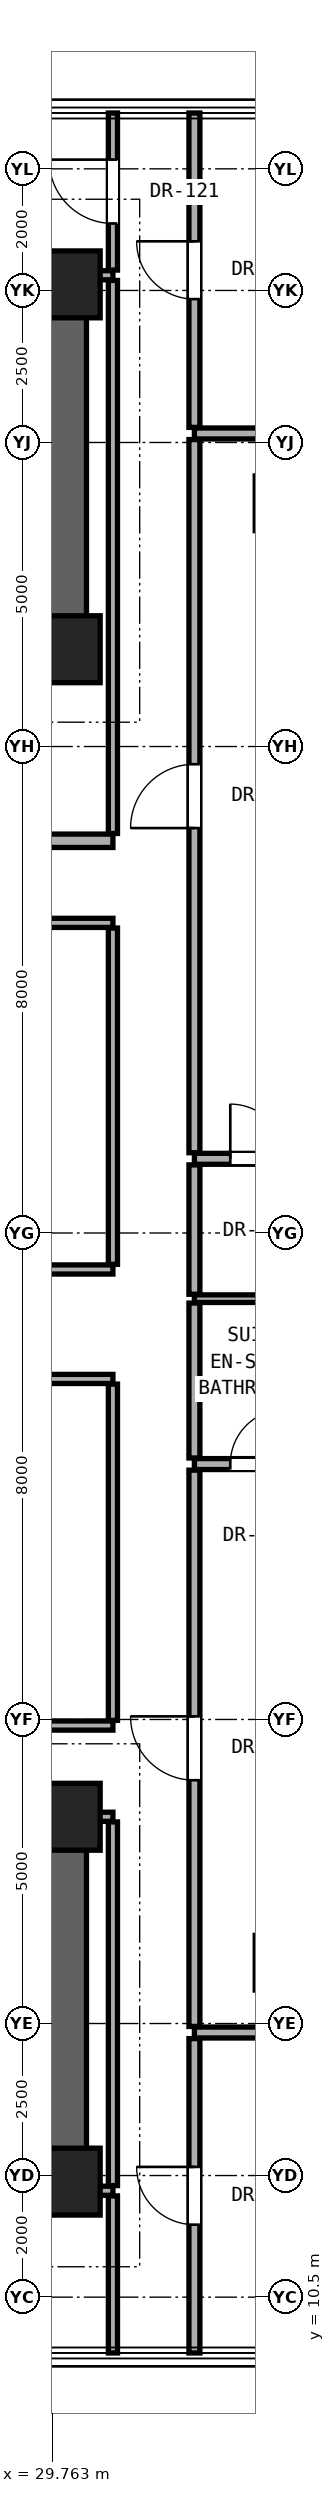
"""IFC4 building model, lengths in metres.
Left out: names, types, materials, properties, quantities, classifications, styles, units other than length and angle.
Written with IfcOpenShell. Run it as: python <this file> out.ifc"""

import sys

from ifc_helpers import new_model, si_unit, direction, frame, frame_2d, origin, origin_2d, place, context, subcontext, project, spatial, rectangle, extrude, element, fill, save


model = new_model("IFC4")
c1 = context("Model", 3, precision=1e-05, world=origin(), true_north=direction((0.0, 1.0)))
c2 = subcontext(c1, "Body", "Model", "MODEL_VIEW")
j1 = project(units=[si_unit("LENGTHUNIT", "METRE"), si_unit("PLANEANGLEUNIT", "RADIAN")], contexts=[c1])
p1 = place(None, origin())
s1 = spatial("IfcSite", under=j1, at=p1, CompositionType="ELEMENT")
p2 = place(p1, origin())
s2 = spatial("IfcBuilding", under=s1, at=p2, CompositionType="ELEMENT")
p3 = place(p2, frame((0.0, 0.0, 121.4)))
s3 = spatial("IfcBuildingStorey", under=s2, at=p3, CompositionType="ELEMENT", Elevation=121.4)
for number, where, z_axis, x_axis in (
    (1, (30.0, 12.4, 0.0), (0.0, 0.0, 1.0), (1.0, 0.0, 0.0)),
    (2, (30.0, 18.4, 0.0), (0.0, 0.0, 1.0), (1.0, 0.0, 0.0)),
    (3, (30.0, 37.6, 0.0), (0.0, 0.0, 1.0), (1.0, 0.0, 0.0)),
    (4, (30.0, 43.6, 0.0), (0.0, 0.0, 1.0), (1.0, 0.0, 0.0)),
):
    element("IfcColumn", number, at=place(p3, frame(where, z_axis=z_axis, x_axis=x_axis)), inside=s3, PredefinedType="COLUMN", context=c2, shape_type="SweptSolid", body=[
        extrude(rectangle(XDim=1.1, YDim=1.1, at=origin_2d()), origin(), (0.0, 0.0, 1.0), 3.3),
    ])
for number, where, z_axis, x_axis in (
    (5, (33.4, 16.0, 0.0), (0.0, 0.0, 1.0), (1.0, 0.0, 0.0)),
    (6, (33.4, 40.0, 0.0), (0.0, 0.0, 1.0), (1.0, 0.0, 0.0)),
):
    element("IfcColumn", number, at=place(p3, frame(where, z_axis=z_axis, x_axis=x_axis)), inside=s3, PredefinedType="PILASTER", context=c2, shape_type="SweptSolid", body=[
        extrude(rectangle(XDim=0.6, YDim=0.9, at=origin_2d()), origin(), (0.0, 0.0, 1.0), 3.3),
    ])
p4 = place(p3, frame((11.0, 43.6, 0.0), z_axis=(0.0, 0.0, 1.0), x_axis=(1.0, 0.0, 0.0)))
e7 = element("IfcWall", 7, at=p4, inside=s3, PredefinedType="SHEAR", context=c2, shape_type="SweptSolid", body=[
    extrude(rectangle(XDim=19.0, YDim=0.65, at=frame_2d((9.5, 0.0))), origin(), (0.0, 0.0, 1.0), 3.08),
])
p5 = place(p3, frame((30.0, 37.6, 0.0), z_axis=(0.0, 0.0, 1.0), x_axis=(0.0, 1.0, 0.0)))
e8 = element("IfcWall", 8, at=p5, inside=s3, PredefinedType="SHEAR", context=c2, shape_type="SweptSolid", body=[
    extrude(rectangle(XDim=6.0, YDim=0.65, at=frame_2d((3.0, 0.0))), origin(), (0.0, 0.0, 1.0), 3.08),
])
p6 = place(p3, frame((11.0, 37.6, 0.0), z_axis=(0.0, 0.0, 1.0), x_axis=(1.0, 0.0, 0.0)))
e9 = element("IfcWall", 9, at=p6, inside=s3, PredefinedType="SHEAR", context=c2, shape_type="SweptSolid", body=[
    extrude(rectangle(XDim=19.0, YDim=0.65, at=frame_2d((9.5, 0.0))), origin(), (0.0, 0.0, 1.0), 3.08),
])
p7 = place(p6, frame((1.06, 0.0, 0.0)))
e10 = element("IfcOpeningElement", 10, at=p7, cuts=e9, PredefinedType="OPENING", context=c2, shape_type="SweptSolid", body=[
    extrude(rectangle(XDim=1.15, YDim=2.2, at=frame_2d((0.575, 1.1))), frame((0.0, 0.335, 0.0), z_axis=(0.0, -1.0, 0.0), x_axis=(1.0, 0.0, 0.0)), (0.0, 0.0, 1.0), 0.67),
])
p8 = place(p6, frame((9.55, 0.0, 0.0)))
e11 = element("IfcOpeningElement", 11, at=p8, cuts=e9, PredefinedType="OPENING", context=c2, shape_type="SweptSolid", body=[
    extrude(rectangle(XDim=1.4, YDim=2.35, at=frame_2d((0.7, 1.175))), frame((0.0, 0.335, 0.0), z_axis=(0.0, -1.0, 0.0), x_axis=(1.0, 0.0, 0.0)), (0.0, 0.0, 1.0), 0.67),
])
p9 = place(p6, frame((11.95, 0.0, 0.0)))
e12 = element("IfcOpeningElement", 12, at=p9, cuts=e9, PredefinedType="OPENING", context=c2, shape_type="SweptSolid", body=[
    extrude(rectangle(XDim=1.4, YDim=2.35, at=frame_2d((0.7, 1.175))), frame((0.0, 0.335, 0.0), z_axis=(0.0, -1.0, 0.0), x_axis=(1.0, 0.0, 0.0)), (0.0, 0.0, 1.0), 0.67),
])
p10 = place(p3, frame((11.0, 12.4, 0.0), z_axis=(0.0, 0.0, 1.0), x_axis=(1.0, 0.0, 0.0)))
e13 = element("IfcWall", 13, at=p10, inside=s3, PredefinedType="SHEAR", context=c2, shape_type="SweptSolid", body=[
    extrude(rectangle(XDim=19.0, YDim=0.65, at=frame_2d((9.5, 0.0))), origin(), (0.0, 0.0, 1.0), 3.08),
])
p11 = place(p3, frame((30.0, 12.4, 0.0), z_axis=(0.0, 0.0, 1.0), x_axis=(0.0, 1.0, 0.0)))
e14 = element("IfcWall", 14, at=p11, inside=s3, PredefinedType="SHEAR", context=c2, shape_type="SweptSolid", body=[
    extrude(rectangle(XDim=6.0, YDim=0.65, at=frame_2d((3.0, 0.0))), origin(), (0.0, 0.0, 1.0), 3.08),
])
p12 = place(p3, frame((11.0, 18.4, 0.0), z_axis=(0.0, 0.0, 1.0), x_axis=(1.0, 0.0, 0.0)))
e15 = element("IfcWall", 15, at=p12, inside=s3, PredefinedType="SHEAR", context=c2, shape_type="SweptSolid", body=[
    extrude(rectangle(XDim=19.0, YDim=0.65, at=frame_2d((9.5, 0.0))), origin(), (0.0, 0.0, 1.0), 3.08),
])
p13 = place(p12, frame((4.175, 0.0, 0.0)))
e16 = element("IfcOpeningElement", 16, at=p13, cuts=e15, PredefinedType="OPENING", context=c2, shape_type="SweptSolid", body=[
    extrude(rectangle(XDim=1.2, YDim=2.25, at=frame_2d((0.6, 1.125))), frame((0.0, 0.335, 0.0), z_axis=(0.0, -1.0, 0.0), x_axis=(1.0, 0.0, 0.0)), (0.0, 0.0, 1.0), 0.67),
])
p14 = place(p12, frame((9.6, 0.0, 0.0)))
e17 = element("IfcOpeningElement", 17, at=p14, cuts=e15, PredefinedType="OPENING", context=c2, shape_type="SweptSolid", body=[
    extrude(rectangle(XDim=1.3, YDim=2.3, at=frame_2d((0.65, 1.15))), frame((0.0, 0.335, 0.0), z_axis=(0.0, -1.0, 0.0), x_axis=(1.0, 0.0, 0.0)), (0.0, 0.0, 1.0), 0.67),
])
p15 = place(p12, frame((11.9, 0.0, 0.0)))
e18 = element("IfcOpeningElement", 18, at=p15, cuts=e15, PredefinedType="OPENING", context=c2, shape_type="SweptSolid", body=[
    extrude(rectangle(XDim=1.3, YDim=2.3, at=frame_2d((0.65, 1.15))), frame((0.0, 0.335, 0.0), z_axis=(0.0, -1.0, 0.0), x_axis=(1.0, 0.0, 0.0)), (0.0, 0.0, 1.0), 0.67),
])
p16 = place(p12, frame((14.3, 0.0, 0.0)))
e19 = element("IfcOpeningElement", 19, at=p16, cuts=e15, PredefinedType="OPENING", context=c2, shape_type="SweptSolid", body=[
    extrude(rectangle(XDim=1.3, YDim=2.3, at=frame_2d((0.65, 1.15))), frame((0.0, 0.335, 0.0), z_axis=(0.0, -1.0, 0.0), x_axis=(1.0, 0.0, 0.0)), (0.0, 0.0, 1.0), 0.67),
])
p17 = place(p12, frame((16.6, 0.0, 0.0)))
e20 = element("IfcOpeningElement", 20, at=p17, cuts=e15, PredefinedType="OPENING", context=c2, shape_type="SweptSolid", body=[
    extrude(rectangle(XDim=1.3, YDim=2.3, at=frame_2d((0.65, 1.15))), frame((0.0, 0.335, 0.0), z_axis=(0.0, -1.0, 0.0), x_axis=(1.0, 0.0, 0.0)), (0.0, 0.0, 1.0), 0.67),
])
p18 = place(p3, frame((30.32, 12.25, 0.0), z_axis=(0.0, 0.0, 1.0), x_axis=(1.0, 0.0, 0.0)))
e21 = element("IfcWall", 21, at=p18, inside=s3, PredefinedType="PARTITIONING", context=c2, shape_type="SweptSolid", body=[
    extrude(rectangle(XDim=0.44, YDim=0.15, at=frame_2d((0.22, 0.0))), origin(), (0.0, 0.0, 1.0), 3.08),
])
p19 = place(p3, frame((32.1, 14.852, 0.0), z_axis=(0.0, 0.0, 1.0), x_axis=(1.0, 0.0, 0.0)))
e22 = element("IfcWall", 22, at=p19, inside=s3, PredefinedType="PARTITIONING", context=c2, shape_type="SweptSolid", body=[
    extrude(rectangle(XDim=3.27, YDim=0.18, at=frame_2d((1.635, 0.0))), origin(), (0.0, 0.0, 1.0), 3.08),
])
p20 = place(p3, frame((30.32, 18.4, 0.0), z_axis=(0.0, 0.0, 1.0), x_axis=(1.0, 0.0, 0.0)))
e23 = element("IfcWall", 23, at=p20, inside=s3, PredefinedType="PARTITIONING", context=c2, shape_type="SweptSolid", body=[
    extrude(rectangle(XDim=0.44, YDim=0.15, at=frame_2d((0.22, 0.0))), origin(), (0.0, 0.0, 1.0), 2.456),
])
p21 = place(p3, frame((21.44, 19.9, 0.0), z_axis=(0.0, 0.0, 1.0), x_axis=(1.0, 0.0, 0.0)))
e24 = element("IfcWall", 24, at=p21, inside=s3, PredefinedType="PARTITIONING", context=c2, shape_type="SweptSolid", body=[
    extrude(rectangle(XDim=9.32, YDim=0.15, at=frame_2d((4.66, 0.0))), origin(), (0.0, 0.0, 1.0), 2.216),
])
p22 = place(p21, frame((4.185, 0.0, 0.0)))
e25 = element("IfcOpeningElement", 25, at=p22, cuts=e24, PredefinedType="OPENING", context=c2, shape_type="SweptSolid", body=[
    extrude(rectangle(XDim=0.95, YDim=2.15, at=frame_2d((0.475, 1.075))), frame((0.0, 0.085, 0.0), z_axis=(0.0, -1.0, 0.0), x_axis=(1.0, 0.0, 0.0)), (0.0, 0.0, 1.0), 0.17),
])
p23 = place(p3, frame((32.1, 24.2, 0.0), z_axis=(0.0, 0.0, 1.0), x_axis=(1.0, 0.0, 0.0)))
e26 = element("IfcWall", 26, at=p23, inside=s3, PredefinedType="PARTITIONING", context=c2, shape_type="SweptSolid", body=[
    extrude(rectangle(XDim=8.56, YDim=0.18, at=frame_2d((4.28, 0.0))), origin(), (0.0, 0.0, 1.0), 2.299),
])
p24 = place(p23, frame((4.805, 0.0, 0.0)))
e27 = element("IfcOpeningElement", 27, at=p24, cuts=e26, PredefinedType="OPENING", context=c2, shape_type="SweptSolid", body=[
    extrude(rectangle(XDim=0.95, YDim=2.15, at=frame_2d((0.475, 1.075))), frame((0.0, 0.1, 0.0), z_axis=(0.0, -1.0, 0.0), x_axis=(1.0, 0.0, 0.0)), (0.0, 0.0, 1.0), 0.2),
])
p25 = place(p23, frame((0.59, 0.0, 0.0)))
e28 = element("IfcOpeningElement", 28, at=p25, cuts=e26, PredefinedType="OPENING", context=c2, shape_type="SweptSolid", body=[
    extrude(rectangle(XDim=0.9, YDim=2.1, at=frame_2d((0.45, 1.05))), frame((0.0, 0.1, 0.0), z_axis=(0.0, -1.0, 0.0), x_axis=(1.0, 0.0, 0.0)), (0.0, 0.0, 1.0), 0.2),
])
p26 = place(p3, frame((21.4, 25.6, 0.0), z_axis=(0.0, 0.0, 1.0), x_axis=(1.0, 0.0, 0.0)))
e29 = element("IfcWall", 29, at=p26, inside=s3, PredefinedType="PARTITIONING", context=c2, shape_type="SweptSolid", body=[
    extrude(rectangle(XDim=9.36, YDim=0.15, at=frame_2d((4.68, 0.0))), origin(), (0.0, 0.0, 1.0), 2.216),
])
p27 = place(p3, frame((32.1, 26.92, 0.0), z_axis=(0.0, 0.0, 1.0), x_axis=(1.0, 0.0, 0.0)))
e30 = element("IfcWall", 30, at=p27, inside=s3, PredefinedType="PARTITIONING", context=c2, shape_type="SweptSolid", body=[
    extrude(rectangle(XDim=8.56, YDim=0.125, at=frame_2d((4.28, 0.0))), origin(), (0.0, 0.0, 1.0), 2.299),
])
p28 = place(p3, frame((21.4, 27.4, 0.0), z_axis=(0.0, 0.0, 1.0), x_axis=(1.0, 0.0, 0.0)))
e31 = element("IfcWall", 31, at=p28, inside=s3, PredefinedType="PARTITIONING", context=c2, shape_type="SweptSolid", body=[
    extrude(rectangle(XDim=9.36, YDim=0.15, at=frame_2d((4.68, 0.0))), origin(), (0.0, 0.0, 1.0), 2.216),
])
p29 = place(p3, frame((32.1, 29.22, 0.0), z_axis=(0.0, 0.0, 1.0), x_axis=(1.0, 0.0, 0.0)))
e32 = element("IfcWall", 32, at=p29, inside=s3, PredefinedType="PARTITIONING", context=c2, shape_type="SweptSolid", body=[
    extrude(rectangle(XDim=8.56, YDim=0.18, at=frame_2d((4.28, 0.0))), origin(), (0.0, 0.0, 1.0), 2.299),
])
p30 = place(p29, frame((4.805, 0.0, 0.0)))
e33 = element("IfcOpeningElement", 33, at=p30, cuts=e32, PredefinedType="OPENING", context=c2, shape_type="SweptSolid", body=[
    extrude(rectangle(XDim=0.95, YDim=2.15, at=frame_2d((0.475, 1.075))), frame((0.0, 0.1, 0.0), z_axis=(0.0, -1.0, 0.0), x_axis=(1.0, 0.0, 0.0)), (0.0, 0.0, 1.0), 0.2),
])
p31 = place(p29, frame((0.59, 0.0, 0.0)))
e34 = element("IfcOpeningElement", 34, at=p31, cuts=e32, PredefinedType="OPENING", context=c2, shape_type="SweptSolid", body=[
    extrude(rectangle(XDim=0.9, YDim=2.1, at=frame_2d((0.45, 1.05))), frame((0.0, 0.1, 0.0), z_axis=(0.0, -1.0, 0.0), x_axis=(1.0, 0.0, 0.0)), (0.0, 0.0, 1.0), 0.2),
])
p32 = place(p3, frame((21.44, 33.1, 0.0), z_axis=(0.0, 0.0, 1.0), x_axis=(1.0, 0.0, 0.0)))
e35 = element("IfcWall", 35, at=p32, inside=s3, PredefinedType="PARTITIONING", context=c2, shape_type="SweptSolid", body=[
    extrude(rectangle(XDim=9.32, YDim=0.15, at=frame_2d((4.66, 0.0))), origin(), (0.0, 0.0, 1.0), 2.216),
])
p33 = place(p32, frame((4.185, 0.0, 0.0)))
e36 = element("IfcOpeningElement", 36, at=p33, cuts=e35, PredefinedType="OPENING", context=c2, shape_type="SweptSolid", body=[
    extrude(rectangle(XDim=0.95, YDim=2.15, at=frame_2d((0.475, 1.075))), frame((0.0, 0.085, 0.0), z_axis=(0.0, -1.0, 0.0), x_axis=(1.0, 0.0, 0.0)), (0.0, 0.0, 1.0), 0.17),
])
p34 = place(p3, frame((15.59, 34.45, 0.0), z_axis=(0.0, 0.0, 1.0), x_axis=(1.0, 0.0, 0.0)))
e37 = element("IfcWall", 37, at=p34, inside=s3, PredefinedType="SOLIDWALL", context=c2, shape_type="SweptSolid", body=[
    extrude(rectangle(XDim=15.17, YDim=0.22, at=frame_2d((7.585, 0.0))), origin(), (0.0, 0.0, 1.0), 2.216),
])
p35 = place(p34, frame((6.435, 0.0, 0.0)))
e38 = element("IfcOpeningElement", 38, at=p35, cuts=e37, PredefinedType="OPENING", context=c2, shape_type="SweptSolid", body=[
    extrude(rectangle(XDim=0.85, YDim=2.01, at=frame_2d((0.425, 1.005))), frame((0.0, 0.12, 0.0), z_axis=(0.0, -1.0, 0.0), x_axis=(1.0, 0.0, 0.0)), (0.0, 0.0, 1.0), 0.24),
])
p36 = place(p34, frame((11.085, 0.0, 0.0)))
e39 = element("IfcOpeningElement", 39, at=p36, cuts=e37, PredefinedType="OPENING", context=c2, shape_type="SweptSolid", body=[
    extrude(rectangle(XDim=0.95, YDim=2.15, at=frame_2d((0.475, 1.075))), frame((0.0, 0.12, 0.0), z_axis=(0.0, -1.0, 0.0), x_axis=(1.0, 0.0, 0.0)), (0.0, 0.0, 1.0), 0.24),
])
p37 = place(p34, frame((1.775, 0.0, 0.0)))
e40 = element("IfcOpeningElement", 40, at=p37, cuts=e37, PredefinedType="OPENING", context=c2, shape_type="SweptSolid", body=[
    extrude(rectangle(XDim=0.85, YDim=2.01, at=frame_2d((0.425, 1.005))), frame((0.0, 0.12, 0.0), z_axis=(0.0, -1.0, 0.0), x_axis=(1.0, 0.0, 0.0)), (0.0, 0.0, 1.0), 0.24),
])
p38 = place(p3, frame((32.1, 41.148, 0.0), z_axis=(0.0, 0.0, 1.0), x_axis=(1.0, 0.0, 0.0)))
e41 = element("IfcWall", 41, at=p38, inside=s3, PredefinedType="PARTITIONING", context=c2, shape_type="SweptSolid", body=[
    extrude(rectangle(XDim=3.27, YDim=0.18, at=frame_2d((1.635, 0.0))), origin(), (0.0, 0.0, 1.0), 3.08),
])
p39 = place(p3, frame((30.32, 43.75, 0.0), z_axis=(0.0, 0.0, 1.0), x_axis=(1.0, 0.0, 0.0)))
e42 = element("IfcWall", 42, at=p39, inside=s3, PredefinedType="PARTITIONING", context=c2, shape_type="SweptSolid", body=[
    extrude(rectangle(XDim=0.44, YDim=0.15, at=frame_2d((0.22, 0.0))), origin(), (0.0, 0.0, 1.0), 3.08),
])
p40 = place(p3, frame((30.76, 9.582, 0.0), z_axis=(0.0, 0.0, 1.0), x_axis=(0.0, 1.0, 0.0)))
e43 = element("IfcWall", 43, at=p40, inside=s3, PredefinedType="PARTITIONING", context=c2, shape_type="SweptSolid", body=[
    extrude(rectangle(XDim=2.583, YDim=0.15, at=frame_2d((1.292, 0.0))), origin(), (0.0, 0.0, 1.0), 3.08),
])
p41 = place(p3, frame((30.76, 12.335, 0.0), z_axis=(0.0, 0.0, 1.0), x_axis=(0.0, 1.0, 0.0)))
e44 = element("IfcWall", 44, at=p41, inside=s3, PredefinedType="PARTITIONING", context=c2, shape_type="SweptSolid", body=[
    extrude(rectangle(XDim=5.98, YDim=0.15, at=frame_2d((2.99, 0.0))), origin(), (0.0, 0.0, 1.0), 2.456),
])
for number, where, z_axis, x_axis in (
    (45, (30.76, 19.985, 0.0), (0.0, 0.0, 1.0), (0.0, 1.0, 0.0)),
    (46, (30.76, 27.485, 0.0), (0.0, 0.0, 1.0), (0.0, 1.0, 0.0)),
):
    element("IfcWall", number, at=place(p3, frame(where, z_axis=z_axis, x_axis=x_axis)), inside=s3, PredefinedType="PARTITIONING", context=c2, shape_type="SweptSolid", body=[
        extrude(rectangle(XDim=5.53, YDim=0.15, at=frame_2d((2.765, 0.0))), origin(), (0.0, 0.0, 1.0), 2.299),
    ])
p42 = place(p3, frame((30.76, 34.57, 0.0), z_axis=(0.0, 0.0, 1.0), x_axis=(0.0, 1.0, 0.0)))
e47 = element("IfcWall", 47, at=p42, inside=s3, PredefinedType="PARTITIONING", context=c2, shape_type="SweptSolid", body=[
    extrude(rectangle(XDim=9.095, YDim=0.15, at=frame_2d((4.547, 0.0))), origin(), (0.0, 0.0, 1.0), 2.456),
])
p43 = place(p3, frame((30.76, 43.835, 0.0), z_axis=(0.0, 0.0, 1.0), x_axis=(0.0, 1.0, 0.0)))
e48 = element("IfcWall", 48, at=p43, inside=s3, PredefinedType="PARTITIONING", context=c2, shape_type="SweptSolid", body=[
    extrude(rectangle(XDim=2.583, YDim=0.15, at=frame_2d((1.292, 0.0))), origin(), (0.0, 0.0, 1.0), 3.08),
])
p44 = place(p43, frame((0.767, 0.0, 0.0)))
e49 = element("IfcOpeningElement", 49, at=p44, cuts=e48, PredefinedType="OPENING", context=c2, shape_type="SweptSolid", body=[
    extrude(rectangle(XDim=1.05, YDim=2.2, at=frame_2d((0.525, 1.1))), frame((0.0, 0.085, 0.0), z_axis=(0.0, -1.0, 0.0), x_axis=(1.0, 0.0, 0.0)), (0.0, 0.0, 1.0), 0.17),
])
p45 = place(p3, frame((32.1, 9.582, 0.0), z_axis=(0.0, 0.0, 1.0), x_axis=(0.0, 1.0, 0.0)))
e50 = element("IfcWall", 50, at=p45, inside=s3, PredefinedType="PARTITIONING", context=c2, shape_type="SweptSolid", body=[
    extrude(rectangle(XDim=5.17, YDim=0.18, at=frame_2d((2.585, 0.0))), origin(), (0.0, 0.0, 1.0), 3.08),
])
p46 = place(p45, frame((2.11, 0.0, 0.0)))
e51 = element("IfcOpeningElement", 51, at=p46, cuts=e50, PredefinedType="OPENING", context=c2, shape_type="SweptSolid", body=[
    extrude(rectangle(XDim=0.95, YDim=2.15, at=frame_2d((0.475, 1.075))), frame((0.0, 0.1, 0.0), z_axis=(0.0, -1.0, 0.0), x_axis=(1.0, 0.0, 0.0)), (0.0, 0.0, 1.0), 0.2),
])
p47 = place(p3, frame((32.1, 14.952, 0.0), z_axis=(0.0, 0.0, 1.0), x_axis=(0.0, 1.0, 0.0)))
e52 = element("IfcWall", 52, at=p47, inside=s3, PredefinedType="PARTITIONING", context=c2, shape_type="SweptSolid", body=[
    extrude(rectangle(XDim=9.148, YDim=0.18, at=frame_2d((4.574, 0.0))), origin(), (0.0, 0.0, 1.0), 2.456),
])
p48 = place(p47, frame((4.049, 0.0, 0.0)))
e53 = element("IfcOpeningElement", 53, at=p48, cuts=e52, PredefinedType="OPENING", context=c2, shape_type="SweptSolid", body=[
    extrude(rectangle(XDim=1.05, YDim=2.2, at=frame_2d((0.525, 1.1))), frame((0.0, 0.1, 0.0), z_axis=(0.0, -1.0, 0.0), x_axis=(1.0, 0.0, 0.0)), (0.0, 0.0, 1.0), 0.2),
])
p49 = place(p3, frame((32.1, 24.3, 0.0), z_axis=(0.0, 0.0, 1.0), x_axis=(0.0, 1.0, 0.0)))
e54 = element("IfcWall", 54, at=p49, inside=s3, PredefinedType="PARTITIONING", context=c2, shape_type="SweptSolid", body=[
    extrude(rectangle(XDim=2.547, YDim=0.18, at=frame_2d((1.274, 0.0))), origin(), (0.0, 0.0, 1.0), 2.299),
])
p50 = place(p3, frame((32.1, 26.992, 0.0), z_axis=(0.0, 0.0, 1.0), x_axis=(0.0, 1.0, 0.0)))
e55 = element("IfcWall", 55, at=p50, inside=s3, PredefinedType="PARTITIONING", context=c2, shape_type="SweptSolid", body=[
    extrude(rectangle(XDim=2.128, YDim=0.18, at=frame_2d((1.064, 0.0))), origin(), (0.0, 0.0, 1.0), 3.08),
])
p51 = place(p3, frame((32.1, 29.32, 0.0), z_axis=(0.0, 0.0, 1.0), x_axis=(0.0, 1.0, 0.0)))
e56 = element("IfcWall", 56, at=p51, inside=s3, PredefinedType="PARTITIONING", context=c2, shape_type="SweptSolid", body=[
    extrude(rectangle(XDim=11.728, YDim=0.18, at=frame_2d((5.864, 0.0))), origin(), (0.0, 0.0, 1.0), 2.299),
])
p52 = place(p51, frame((5.339, 0.0, 0.0)))
e57 = element("IfcOpeningElement", 57, at=p52, cuts=e56, PredefinedType="OPENING", context=c2, shape_type="SweptSolid", body=[
    extrude(rectangle(XDim=1.05, YDim=2.2, at=frame_2d((0.525, 1.1))), frame((0.0, 0.1, 0.0), z_axis=(0.0, -1.0, 0.0), x_axis=(1.0, 0.0, 0.0)), (0.0, 0.0, 1.0), 0.2),
])
p53 = place(p3, frame((32.1, 41.248, 0.0), z_axis=(0.0, 0.0, 1.0), x_axis=(0.0, 1.0, 0.0)))
e58 = element("IfcWall", 58, at=p53, inside=s3, PredefinedType="PARTITIONING", context=c2, shape_type="SweptSolid", body=[
    extrude(rectangle(XDim=5.17, YDim=0.18, at=frame_2d((2.585, 0.0))), origin(), (0.0, 0.0, 1.0), 3.08),
])
p54 = place(p53, frame((2.11, 0.0, 0.0)))
e59 = element("IfcOpeningElement", 59, at=p54, cuts=e58, PredefinedType="OPENING", context=c2, shape_type="SweptSolid", body=[
    extrude(rectangle(XDim=0.95, YDim=2.15, at=frame_2d((0.475, 1.075))), frame((0.0, 0.1, 0.0), z_axis=(0.0, -1.0, 0.0), x_axis=(1.0, 0.0, 0.0)), (0.0, 0.0, 1.0), 0.2),
])
p55 = place(p48, origin())
e60 = element("IfcDoor", 60, at=p55, inside=s3, OperationType="SINGLE_SWING_RIGHT", PredefinedType="DOOR", context=c2, shape_type="SweptSolid", body=[
    extrude(rectangle(XDim=1.05, YDim=2.2, at=frame_2d((0.525, 1.1))), frame((0.0, 0.025, 0.0), z_axis=(0.0, -1.0, 0.0), x_axis=(1.0, 0.0, 0.0)), (0.0, 0.0, 1.0), 0.05),
])
fill(e53, e60)
p56 = place(p25, origin())
e61 = element("IfcDoor", 61, at=p56, inside=s3, OperationType="SINGLE_SWING_RIGHT", PredefinedType="DOOR", context=c2, shape_type="SweptSolid", body=[
    extrude(rectangle(XDim=0.9, YDim=2.1, at=frame_2d((0.45, 1.05))), frame((0.0, 0.025, 0.0), z_axis=(0.0, -1.0, 0.0), x_axis=(1.0, 0.0, 0.0)), (0.0, 0.0, 1.0), 0.05),
])
fill(e28, e61)
p57 = place(p52, origin())
e62 = element("IfcDoor", 62, at=p57, inside=s3, OperationType="SINGLE_SWING_LEFT", PredefinedType="DOOR", context=c2, shape_type="SweptSolid", body=[
    extrude(rectangle(XDim=1.05, YDim=2.2, at=frame_2d((0.525, 1.1))), frame((0.0, 0.025, 0.0), z_axis=(0.0, -1.0, 0.0), x_axis=(1.0, 0.0, 0.0)), (0.0, 0.0, 1.0), 0.05),
])
fill(e57, e62)
p58 = place(p31, origin())
e63 = element("IfcDoor", 63, at=p58, inside=s3, OperationType="SINGLE_SWING_LEFT", PredefinedType="DOOR", context=c2, shape_type="SweptSolid", body=[
    extrude(rectangle(XDim=0.9, YDim=2.1, at=frame_2d((0.45, 1.05))), frame((0.0, 0.025, 0.0), z_axis=(0.0, -1.0, 0.0), x_axis=(1.0, 0.0, 0.0)), (0.0, 0.0, 1.0), 0.05),
])
fill(e34, e63)
p59 = place(p46, origin())
e64 = element("IfcDoor", 64, at=p59, inside=s3, OperationType="SINGLE_SWING_RIGHT", PredefinedType="DOOR", context=c2, shape_type="SweptSolid", body=[
    extrude(rectangle(XDim=0.95, YDim=2.15, at=frame_2d((0.475, 1.075))), frame((0.0, 0.025, 0.0), z_axis=(0.0, -1.0, 0.0), x_axis=(1.0, 0.0, 0.0)), (0.0, 0.0, 1.0), 0.05),
])
fill(e51, e64)
p60 = place(p44, origin())
e65 = element("IfcDoor", 65, at=p60, inside=s3, OperationType="SINGLE_SWING_RIGHT", PredefinedType="DOOR", context=c2, shape_type="SweptSolid", body=[
    extrude(rectangle(XDim=1.05, YDim=2.2, at=frame_2d((0.525, 1.1))), frame((0.0, 0.025, 0.0), z_axis=(0.0, -1.0, 0.0), x_axis=(1.0, 0.0, 0.0)), (0.0, 0.0, 1.0), 0.05),
])
fill(e49, e65)
p61 = place(p54, origin())
e66 = element("IfcDoor", 66, at=p61, inside=s3, OperationType="SINGLE_SWING_RIGHT", PredefinedType="DOOR", context=c2, shape_type="SweptSolid", body=[
    extrude(rectangle(XDim=0.95, YDim=2.15, at=frame_2d((0.475, 1.075))), frame((0.0, 0.025, 0.0), z_axis=(0.0, -1.0, 0.0), x_axis=(1.0, 0.0, 0.0)), (0.0, 0.0, 1.0), 0.05),
])
fill(e59, e66)
save(model, sys.argv[1])
